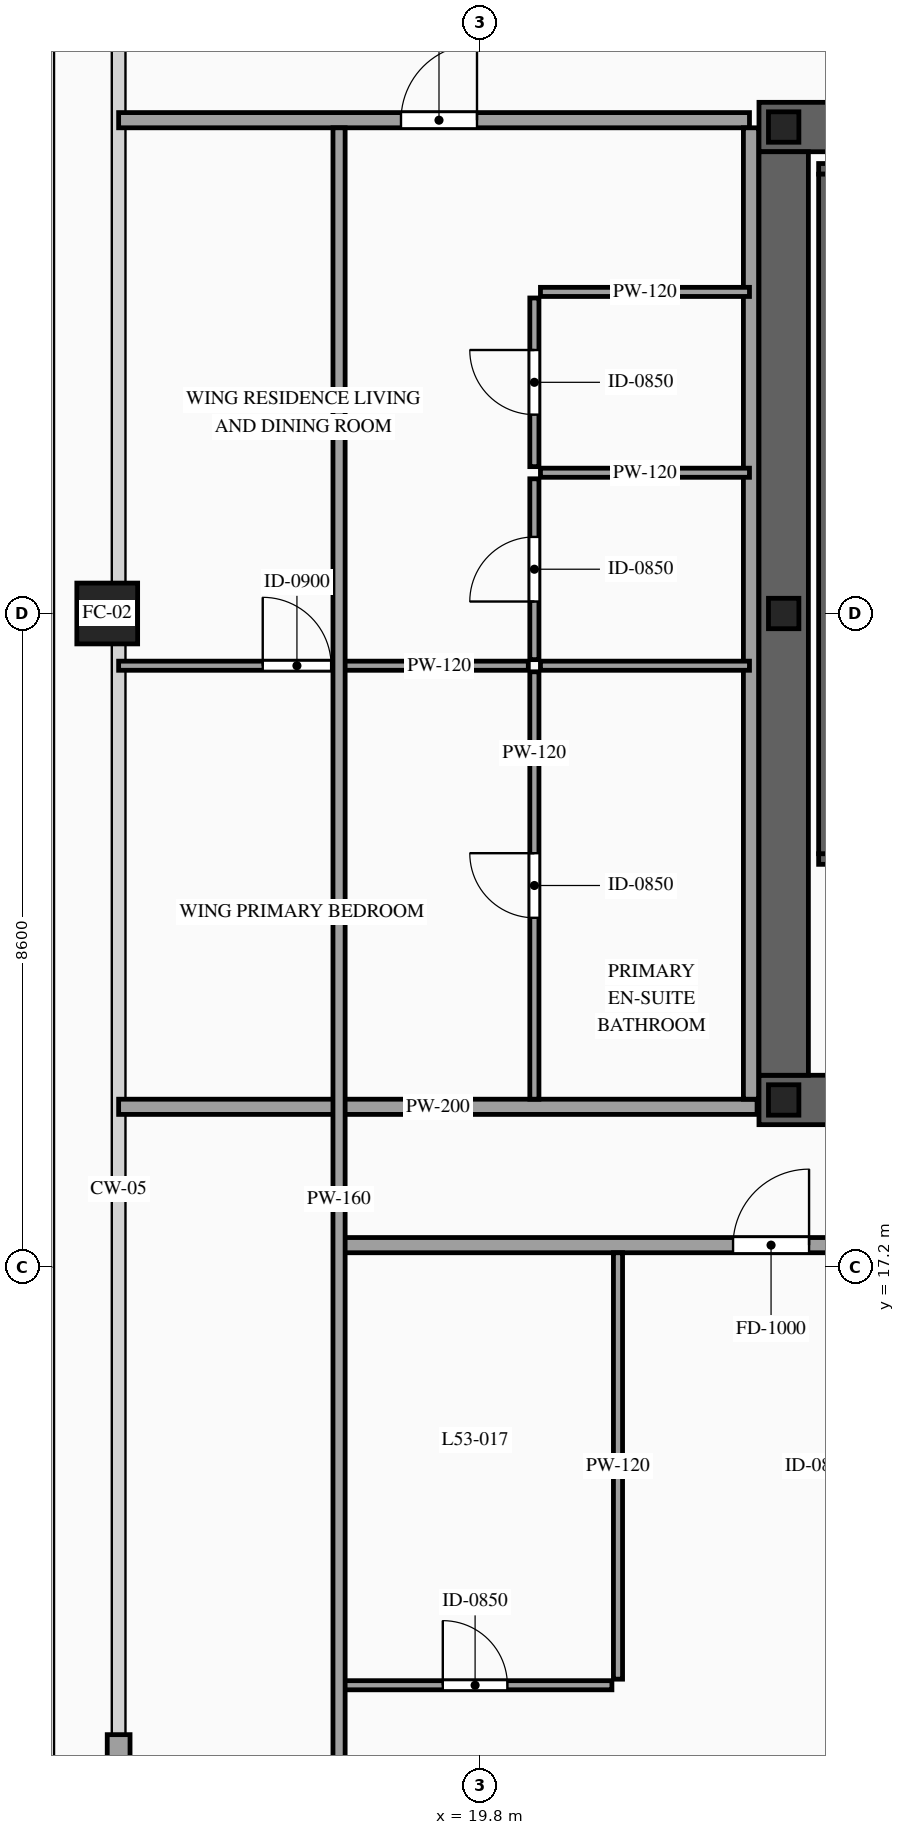
"""IFC4 building model, lengths in metres.
Left out: names, types, materials, properties, quantities, classifications, styles, units other than length and angle.
Written with IfcOpenShell. Run it as: python <this file> out.ifc"""

import sys

from ifc_helpers import new_model, si_unit, direction, frame, frame_2d, origin, origin_2d, place, context, subcontext, project, spatial, rectangle, hollow_rectangle, i_section, extrude, source, transform, mapped, element, fill, save


model = new_model("IFC4")
c1 = context("Model", 3, precision=1e-05, world=origin(), true_north=direction((0.0, 1.0)))
c2 = subcontext(c1, "Body", "Model", "MODEL_VIEW")
j1 = project(units=[si_unit("LENGTHUNIT", "METRE"), si_unit("PLANEANGLEUNIT", "RADIAN")], contexts=[c1])
p1 = place(None, origin())
s1 = spatial("IfcSite", under=j1, at=p1, CompositionType="ELEMENT")
p2 = place(p1, origin())
s2 = spatial("IfcBuilding", under=s1, at=p2, CompositionType="ELEMENT")
p3 = place(p2, frame((0.0, 0.0, 202.0)))
s3 = spatial("IfcBuildingStorey", under=s2, at=p3, CompositionType="ELEMENT", Elevation=202.0)
p4 = place(p3, frame((23.475, 19.4, 0.0), z_axis=(0.0, 0.0, 1.0), x_axis=(1.0, 0.0, 0.0)))
e1 = element("IfcWall", 1, at=p4, inside=s3, PredefinedType="SHEAR", context=c2, shape_type="SweptSolid", body=[
    extrude(rectangle(XDim=27.05, YDim=0.65, at=frame_2d((13.525, 0.0))), origin(), (0.0, 0.0, 1.0), 3.5),
])
p5 = place(p4, frame((1.975, 0.0, 0.0)))
e2 = element("IfcOpeningElement", 2, at=p5, cuts=e1, PredefinedType="OPENING", context=c2, shape_type="SweptSolid", body=[
    extrude(rectangle(XDim=1.1, YDim=2.2, at=frame_2d((0.55, 1.1))), frame((0.0, 0.34, 0.0), z_axis=(0.0, -1.0, 0.0), x_axis=(1.0, 0.0, 0.0)), (0.0, 0.0, 1.0), 0.68),
])
p6 = place(p4, frame((9.875, 0.0, 0.0)))
e3 = element("IfcOpeningElement", 3, at=p6, cuts=e1, PredefinedType="OPENING", context=c2, shape_type="SweptSolid", body=[
    extrude(rectangle(XDim=1.1, YDim=2.2, at=frame_2d((0.55, 1.1))), frame((0.0, 0.34, 0.0), z_axis=(0.0, -1.0, 0.0), x_axis=(1.0, 0.0, 0.0)), (0.0, 0.0, 1.0), 0.68),
])
p7 = place(p4, frame((23.075, 0.0, 0.0)))
e4 = element("IfcOpeningElement", 4, at=p7, cuts=e1, PredefinedType="OPENING", context=c2, shape_type="SweptSolid", body=[
    extrude(rectangle(XDim=1.1, YDim=2.2, at=frame_2d((0.55, 1.1))), frame((0.0, 0.34, 0.0), z_axis=(0.0, -1.0, 0.0), x_axis=(1.0, 0.0, 0.0)), (0.0, 0.0, 1.0), 0.68),
])
p8 = place(p4, frame((19.695, 0.0, 0.0)))
e5 = element("IfcOpeningElement", 5, at=p8, cuts=e1, PredefinedType="OPENING", context=c2, shape_type="SweptSolid", body=[
    extrude(rectangle(XDim=0.9, YDim=2.15, at=frame_2d((0.45, 1.075))), frame((0.0, 0.34, 0.0), z_axis=(0.0, -1.0, 0.0), x_axis=(1.0, 0.0, 0.0)), (0.0, 0.0, 1.0), 0.68),
])
p9 = place(p4, frame((18.255, 0.0, 0.0)))
e6 = element("IfcOpeningElement", 6, at=p9, cuts=e1, PredefinedType="OPENING", context=c2, shape_type="SweptSolid", body=[
    extrude(rectangle(XDim=0.9, YDim=2.15, at=frame_2d((0.45, 1.075))), frame((0.0, 0.34, 0.0), z_axis=(0.0, -1.0, 0.0), x_axis=(1.0, 0.0, 0.0)), (0.0, 0.0, 1.0), 0.68),
])
p10 = place(p3, frame((23.475, 32.2, 0.0), z_axis=(0.0, 0.0, 1.0), x_axis=(1.0, 0.0, 0.0)))
e7 = element("IfcWall", 7, at=p10, inside=s3, PredefinedType="SHEAR", context=c2, shape_type="SweptSolid", body=[
    extrude(rectangle(XDim=27.05, YDim=0.65, at=frame_2d((13.525, 0.0))), origin(), (0.0, 0.0, 1.0), 3.5),
])
p11 = place(p10, frame((4.595, 0.0, 0.0)))
e8 = element("IfcOpeningElement", 8, at=p11, cuts=e7, PredefinedType="OPENING", context=c2, shape_type="SweptSolid", body=[
    extrude(rectangle(XDim=0.9, YDim=2.15, at=frame_2d((0.45, 1.075))), frame((0.0, 0.34, 0.0), z_axis=(0.0, -1.0, 0.0), x_axis=(1.0, 0.0, 0.0)), (0.0, 0.0, 1.0), 0.68),
])
p12 = place(p10, frame((9.875, 0.0, 0.0)))
e9 = element("IfcOpeningElement", 9, at=p12, cuts=e7, PredefinedType="OPENING", context=c2, shape_type="SweptSolid", body=[
    extrude(rectangle(XDim=1.1, YDim=2.2, at=frame_2d((0.55, 1.1))), frame((0.0, 0.34, 0.0), z_axis=(0.0, -1.0, 0.0), x_axis=(1.0, 0.0, 0.0)), (0.0, 0.0, 1.0), 0.68),
])
p13 = place(p10, frame((15.725, 0.0, 0.0)))
e10 = element("IfcOpeningElement", 10, at=p13, cuts=e7, PredefinedType="OPENING", context=c2, shape_type="SweptSolid", body=[
    extrude(rectangle(XDim=1.1, YDim=2.2, at=frame_2d((0.55, 1.1))), frame((0.0, 0.34, 0.0), z_axis=(0.0, -1.0, 0.0), x_axis=(1.0, 0.0, 0.0)), (0.0, 0.0, 1.0), 0.68),
])
m1 = source(origin(), c2, "Body", "SweptSolid", [
    extrude(rectangle(XDim=12.15, YDim=0.65, at=frame_2d((6.075, 0.0))), origin(), (0.0, 0.0, 1.0), 3.5),
])
p14 = place(p3, frame((23.8, 19.725, 0.0), z_axis=(0.0, 0.0, 1.0), x_axis=(0.0, 1.0, 0.0)))
e11 = element("IfcWall", 11, at=p14, inside=s3, PredefinedType="SHEAR", context=c2, shape_type="MappedRepresentation", body=[
    mapped(m1, transform((0.0, 0.0, 0.0), scale=1.0)),
])
m2 = source(origin(), c2, "Body", "SweptSolid", [
    extrude(i_section(OverallWidth=0.4, OverallDepth=0.4, WebThickness=0.013, FlangeThickness=0.021, at=origin_2d()), origin(), (0.0, 0.0, 1.0), 3.5),
])
for number, where, z_axis, x_axis in (
    (12, (23.8, 19.4, 0.0), (0.0, 0.0, 1.0), (1.0, 0.0, 0.0)),
    (13, (23.8, 25.8, 0.0), (0.0, 0.0, 1.0), (1.0, 0.0, 0.0)),
    (14, (23.8, 32.2, 0.0), (0.0, 0.0, 1.0), (1.0, 0.0, 0.0)),
):
    element("IfcColumn", number, at=place(p3, frame(where, z_axis=z_axis, x_axis=x_axis)), inside=s3, PredefinedType="COLUMN", context=c2, shape_type="MappedRepresentation", body=[
        mapped(m2, transform((0.0, 0.0, 0.0), scale=1.0)),
    ])
m3 = source(origin(), c2, "Body", "SweptSolid", [
    extrude(hollow_rectangle(XDim=0.8, YDim=0.8, WallThickness=0.036, at=origin_2d()), origin(), (0.0, 0.0, 1.0), 3.5),
])
p15 = place(p3, frame((14.9, 25.8, 0.0), z_axis=(0.0, 0.0, 1.0), x_axis=(1.0, 0.0, 0.0)))
e15 = element("IfcColumn", 15, at=p15, inside=s3, PredefinedType="COLUMN", context=c2, shape_type="MappedRepresentation", body=[
    mapped(m3, transform((0.0, 0.0, 0.0), scale=1.0)),
])
m4 = source(origin(), c2, "Body", "SweptSolid", [
    extrude(rectangle(XDim=3.05, YDim=0.3, at=frame_2d((1.525, 0.0))), origin(), (0.0, 0.0, 1.0), 2.835),
])
p16 = place(p3, frame((15.05, 8.0, 0.0), z_axis=(0.0, 0.0, 1.0), x_axis=(0.0, 1.0, 0.0)))
e16 = element("IfcWall", 16, at=p16, inside=s3, PredefinedType="SOLIDWALL", context=c2, shape_type="MappedRepresentation", body=[
    mapped(m4, transform((0.0, 0.0, 0.0), scale=1.0)),
])
p17 = place(p3, frame((24.26, 22.57, 0.0), z_axis=(0.0, 0.0, 1.0), x_axis=(1.0, 0.0, 0.0)))
e17 = element("IfcWall", 17, at=p17, inside=s3, PredefinedType="SOLIDWALL", context=c2, shape_type="SweptSolid", body=[
    extrude(rectangle(XDim=3.28, YDim=0.14, at=frame_2d((1.64, 0.0))), origin(), (0.0, 0.0, 1.0), 3.28),
])
p18 = place(p17, frame((1.09, 0.0, 0.0)))
e18 = element("IfcOpeningElement", 18, at=p18, cuts=e17, PredefinedType="OPENING", context=c2, shape_type="SweptSolid", body=[
    extrude(rectangle(XDim=1.1, YDim=2.2, at=frame_2d((0.55, 1.1))), frame((0.0, 0.085, 0.0), z_axis=(0.0, -1.0, 0.0), x_axis=(1.0, 0.0, 0.0)), (0.0, 0.0, 1.0), 0.17),
])
m5 = source(origin(), c2, "Body", "SweptSolid", [
    extrude(rectangle(XDim=3.28, YDim=0.14, at=frame_2d((1.64, 0.0))), origin(), (0.0, 0.0, 1.0), 3.28),
])
p19 = place(p3, frame((24.26, 31.65, 0.0), z_axis=(0.0, 0.0, 1.0), x_axis=(1.0, 0.0, 0.0)))
e19 = element("IfcWall", 19, at=p19, inside=s3, PredefinedType="SOLIDWALL", context=c2, shape_type="MappedRepresentation", body=[
    mapped(m5, transform((0.0, 0.0, 0.0), scale=1.0)),
])
m6 = source(origin(), c2, "Body", "SweptSolid", [
    extrude(rectangle(XDim=8.94, YDim=0.14, at=frame_2d((4.47, 0.0))), origin(), (0.0, 0.0, 1.0), 3.28),
])
p20 = place(p3, frame((24.33, 22.64, 0.0), z_axis=(0.0, 0.0, 1.0), x_axis=(0.0, 1.0, 0.0)))
e20 = element("IfcWall", 20, at=p20, inside=s3, PredefinedType="SOLIDWALL", context=c2, shape_type="MappedRepresentation", body=[
    mapped(m6, transform((0.0, 0.0, 0.0), scale=1.0)),
])
p21 = place(p3, frame((17.94, 17.49, 0.0), z_axis=(0.0, 0.0, 1.0), x_axis=(1.0, 0.0, 0.0)))
e21 = element("IfcWall", 21, at=p21, inside=s3, PredefinedType="PARTITIONING", context=c2, shape_type="SweptSolid", body=[
    extrude(rectangle(XDim=12.5, YDim=0.2, at=frame_2d((6.25, 0.0))), origin(), (0.0, 0.0, 1.0), 3.28),
])
p22 = place(p21, frame((5.194, 0.0, 0.0)))
e22 = element("IfcOpeningElement", 22, at=p22, cuts=e21, PredefinedType="OPENING", context=c2, shape_type="SweptSolid", body=[
    extrude(rectangle(XDim=1.0, YDim=2.2, at=frame_2d((0.5, 1.1))), frame((0.0, 0.115, 0.0), z_axis=(0.0, -1.0, 0.0), x_axis=(1.0, 0.0, 0.0)), (0.0, 0.0, 1.0), 0.23),
])
p23 = place(p3, frame((17.94, 11.7, 0.0), z_axis=(0.0, 0.0, 1.0), x_axis=(1.0, 0.0, 0.0)))
e23 = element("IfcWall", 23, at=p23, inside=s3, PredefinedType="PARTITIONING", context=c2, shape_type="SweptSolid", body=[
    extrude(rectangle(XDim=3.6, YDim=0.12, at=frame_2d((1.8, 0.0))), origin(), (0.0, 0.0, 1.0), 3.28),
])
p24 = place(p23, frame((1.375, 0.0, 0.0)))
e24 = element("IfcOpeningElement", 24, at=p24, cuts=e23, PredefinedType="OPENING", context=c2, shape_type="SweptSolid", body=[
    extrude(rectangle(XDim=0.85, YDim=2.1, at=frame_2d((0.425, 1.05))), frame((0.0, 0.075, 0.0), z_axis=(0.0, -1.0, 0.0), x_axis=(1.0, 0.0, 0.0)), (0.0, 0.0, 1.0), 0.15),
])
m7 = source(origin(), c2, "Body", "SweptSolid", [
    extrude(rectangle(XDim=5.61, YDim=0.12, at=frame_2d((2.805, 0.0))), origin(), (0.0, 0.0, 1.0), 3.28),
])
p25 = place(p3, frame((21.62, 11.78, 0.0), z_axis=(0.0, 0.0, 1.0), x_axis=(0.0, 1.0, 0.0)))
e25 = element("IfcWall", 25, at=p25, inside=s3, PredefinedType="PARTITIONING", context=c2, shape_type="MappedRepresentation", body=[
    mapped(m7, transform((0.0, 0.0, 0.0), scale=1.0)),
])
p26 = place(p3, frame((15.05, 32.29, 0.0), z_axis=(0.0, 0.0, 1.0), x_axis=(1.0, 0.0, 0.0)))
e26 = element("IfcWall", 26, at=p26, inside=s3, PredefinedType="PARTITIONING", context=c2, shape_type="SweptSolid", body=[
    extrude(rectangle(XDim=8.3, YDim=0.2, at=frame_2d((4.15, 0.0))), origin(), (0.0, 0.0, 1.0), 2.775),
])
p27 = place(p26, frame((3.715, 0.0, 0.0)))
e27 = element("IfcOpeningElement", 27, at=p27, cuts=e26, PredefinedType="OPENING", context=c2, shape_type="SweptSolid", body=[
    extrude(rectangle(XDim=1.0, YDim=2.2, at=frame_2d((0.5, 1.1))), frame((0.0, 0.115, 0.0), z_axis=(0.0, -1.0, 0.0), x_axis=(1.0, 0.0, 0.0)), (0.0, 0.0, 1.0), 0.23),
])
m8 = source(origin(), c2, "Body", "SweptSolid", [
    extrude(rectangle(XDim=8.4, YDim=0.2, at=frame_2d((4.2, 0.0))), origin(), (0.0, 0.0, 1.0), 2.775),
])
p28 = place(p3, frame((15.05, 19.31, 0.0), z_axis=(0.0, 0.0, 1.0), x_axis=(1.0, 0.0, 0.0)))
e28 = element("IfcWall", 28, at=p28, inside=s3, PredefinedType="PARTITIONING", context=c2, shape_type="MappedRepresentation", body=[
    mapped(m8, transform((0.0, 0.0, 0.0), scale=1.0)),
])
m9 = source(origin(), c2, "Body", "SweptSolid", [
    extrude(rectangle(XDim=12.78, YDim=0.2, at=frame_2d((6.39, 0.0))), origin(), (0.0, 0.0, 1.0), 3.28),
])
p29 = place(p3, frame((23.37, 19.41, 0.0), z_axis=(0.0, 0.0, 1.0), x_axis=(0.0, 1.0, 0.0)))
e29 = element("IfcWall", 29, at=p29, inside=s3, PredefinedType="PARTITIONING", context=c2, shape_type="MappedRepresentation", body=[
    mapped(m9, transform((0.0, 0.0, 0.0), scale=1.0)),
])
m10 = source(origin(), c2, "Body", "SweptSolid", [
    extrude(rectangle(XDim=2.75, YDim=0.12, at=frame_2d((1.375, 0.0))), origin(), (0.0, 0.0, 1.0), 3.28),
])
for number, where, z_axis, x_axis in (
    (30, (20.6, 25.113, 0.0), (0.0, 0.0, 1.0), (1.0, 0.0, 0.0)),
    (31, (20.6, 27.652, 0.0), (0.0, 0.0, 1.0), (1.0, 0.0, 0.0)),
):
    element("IfcWall", number, at=place(p3, frame(where, z_axis=z_axis, x_axis=x_axis)), inside=s3, PredefinedType="PARTITIONING", context=c2, shape_type="MappedRepresentation", body=[
        mapped(m10, transform((0.0, 0.0, 0.0), scale=1.0)),
    ])
p30 = place(p3, frame((20.52, 25.193, 0.0), z_axis=(0.0, 0.0, 1.0), x_axis=(0.0, 1.0, 0.0)))
e32 = element("IfcWall", 32, at=p30, inside=s3, PredefinedType="PARTITIONING", context=c2, shape_type="SweptSolid", body=[
    extrude(rectangle(XDim=2.379, YDim=0.12, at=frame_2d((1.189, 0.0))), origin(), (0.0, 0.0, 1.0), 3.28),
])
p31 = place(p30, frame((0.764, 0.0, 0.0)))
e33 = element("IfcOpeningElement", 33, at=p31, cuts=e32, PredefinedType="OPENING", context=c2, shape_type="SweptSolid", body=[
    extrude(rectangle(XDim=0.85, YDim=2.1, at=frame_2d((0.425, 1.05))), frame((0.0, 0.075, 0.0), z_axis=(0.0, -1.0, 0.0), x_axis=(1.0, 0.0, 0.0)), (0.0, 0.0, 1.0), 0.15),
])
p32 = place(p3, frame((20.6, 30.031, 0.0), z_axis=(0.0, 0.0, 1.0), x_axis=(1.0, 0.0, 0.0)))
e34 = element("IfcWall", 34, at=p32, inside=s3, PredefinedType="PARTITIONING", context=c2, shape_type="MappedRepresentation", body=[
    mapped(m10, transform((0.0, 0.0, 0.0), scale=1.0)),
])
p33 = place(p3, frame((20.52, 27.732, 0.0), z_axis=(0.0, 0.0, 1.0), x_axis=(0.0, 1.0, 0.0)))
e35 = element("IfcWall", 35, at=p33, inside=s3, PredefinedType="PARTITIONING", context=c2, shape_type="SweptSolid", body=[
    extrude(rectangle(XDim=2.219, YDim=0.12, at=frame_2d((1.109, 0.0))), origin(), (0.0, 0.0, 1.0), 3.28),
])
p34 = place(p33, frame((0.685, 0.0, 0.0)))
e36 = element("IfcOpeningElement", 36, at=p34, cuts=e35, PredefinedType="OPENING", context=c2, shape_type="SweptSolid", body=[
    extrude(rectangle(XDim=0.85, YDim=2.1, at=frame_2d((0.425, 1.05))), frame((0.0, 0.075, 0.0), z_axis=(0.0, -1.0, 0.0), x_axis=(1.0, 0.0, 0.0)), (0.0, 0.0, 1.0), 0.15),
])
p35 = place(p3, frame((15.05, 25.113, 0.0), z_axis=(0.0, 0.0, 1.0), x_axis=(1.0, 0.0, 0.0)))
e37 = element("IfcWall", 37, at=p35, inside=s3, PredefinedType="PARTITIONING", context=c2, shape_type="SweptSolid", body=[
    extrude(rectangle(XDim=5.39, YDim=0.12, at=frame_2d((2.695, 0.0))), origin(), (0.0, 0.0, 1.0), 3.28),
])
p36 = place(p35, frame((1.896, 0.0, 0.0)))
e38 = element("IfcOpeningElement", 38, at=p36, cuts=e37, PredefinedType="OPENING", context=c2, shape_type="SweptSolid", body=[
    extrude(rectangle(XDim=0.9, YDim=2.15, at=frame_2d((0.45, 1.075))), frame((0.0, 0.075, 0.0), z_axis=(0.0, -1.0, 0.0), x_axis=(1.0, 0.0, 0.0)), (0.0, 0.0, 1.0), 0.15),
])
p37 = place(p3, frame((20.52, 19.41, 0.0), z_axis=(0.0, 0.0, 1.0), x_axis=(0.0, 1.0, 0.0)))
e39 = element("IfcWall", 39, at=p37, inside=s3, PredefinedType="PARTITIONING", context=c2, shape_type="SweptSolid", body=[
    extrude(rectangle(XDim=5.623, YDim=0.12, at=frame_2d((2.812, 0.0))), origin(), (0.0, 0.0, 1.0), 3.28),
])
p38 = place(p37, frame((2.386, 0.0, 0.0)))
e40 = element("IfcOpeningElement", 40, at=p38, cuts=e39, PredefinedType="OPENING", context=c2, shape_type="SweptSolid", body=[
    extrude(rectangle(XDim=0.85, YDim=2.1, at=frame_2d((0.425, 1.05))), frame((0.0, 0.075, 0.0), z_axis=(0.0, -1.0, 0.0), x_axis=(1.0, 0.0, 0.0)), (0.0, 0.0, 1.0), 0.15),
])
m11 = source(origin(), c2, "Body", "SweptSolid", [
    extrude(rectangle(XDim=28.19, YDim=0.16, at=frame_2d((14.095, 0.0))), origin(), (0.0, 0.0, 1.0), 3.28),
])
p39 = place(p3, frame((17.95, 4.0, 0.0), z_axis=(0.0, 0.0, 1.0), x_axis=(0.0, 1.0, 0.0)))
e41 = element("IfcWall", 41, at=p39, inside=s3, PredefinedType="PARTITIONING", context=c2, shape_type="MappedRepresentation", body=[
    mapped(m11, transform((0.0, 0.0, 0.0), scale=1.0)),
])
m12 = source(origin(), c2, "Body", "SweptSolid", [
    extrude(rectangle(XDim=1.0, YDim=2.2, at=frame_2d((0.5, 1.1))), frame((0.0, 0.025, 0.0), z_axis=(0.0, -1.0, 0.0), x_axis=(1.0, 0.0, 0.0)), (0.0, 0.0, 1.0), 0.05),
])
p40 = place(p22, origin())
e42 = element("IfcDoor", 42, at=p40, inside=s3, OperationType="SINGLE_SWING_RIGHT", PredefinedType="DOOR", context=c2, shape_type="MappedRepresentation", body=[
    mapped(m12, transform((0.0, 0.0, 0.0), scale=1.0)),
])
fill(e22, e42)
m13 = source(origin(), c2, "Body", "SweptSolid", [
    extrude(rectangle(XDim=0.85, YDim=2.1, at=frame_2d((0.425, 1.05))), frame((0.0, 0.025, 0.0), z_axis=(0.0, -1.0, 0.0), x_axis=(1.0, 0.0, 0.0)), (0.0, 0.0, 1.0), 0.05),
])
p41 = place(p24, origin())
e43 = element("IfcDoor", 43, at=p41, inside=s3, OperationType="SINGLE_SWING_LEFT", PredefinedType="DOOR", context=c2, shape_type="MappedRepresentation", body=[
    mapped(m13, transform((0.0, 0.0, 0.0), scale=1.0)),
])
fill(e24, e43)
p42 = place(p27, origin())
e44 = element("IfcDoor", 44, at=p42, inside=s3, OperationType="SINGLE_SWING_RIGHT", PredefinedType="DOOR", context=c2, shape_type="MappedRepresentation", body=[
    mapped(m12, transform((0.0, 0.0, 0.0), scale=1.0)),
])
fill(e27, e44)
p43 = place(p31, origin())
e45 = element("IfcDoor", 45, at=p43, inside=s3, OperationType="SINGLE_SWING_LEFT", PredefinedType="DOOR", context=c2, shape_type="MappedRepresentation", body=[
    mapped(m13, transform((0.0, 0.0, 0.0), scale=1.0)),
])
fill(e33, e45)
p44 = place(p34, origin())
e46 = element("IfcDoor", 46, at=p44, inside=s3, OperationType="SINGLE_SWING_RIGHT", PredefinedType="DOOR", context=c2, shape_type="MappedRepresentation", body=[
    mapped(m13, transform((0.0, 0.0, 0.0), scale=1.0)),
])
fill(e36, e46)
m14 = source(origin(), c2, "Body", "SweptSolid", [
    extrude(rectangle(XDim=0.9, YDim=2.15, at=frame_2d((0.45, 1.075))), frame((0.0, 0.025, 0.0), z_axis=(0.0, -1.0, 0.0), x_axis=(1.0, 0.0, 0.0)), (0.0, 0.0, 1.0), 0.05),
])
p45 = place(p36, origin())
e47 = element("IfcDoor", 47, at=p45, inside=s3, OperationType="SINGLE_SWING_LEFT", PredefinedType="DOOR", context=c2, shape_type="MappedRepresentation", body=[
    mapped(m14, transform((0.0, 0.0, 0.0), scale=1.0)),
])
fill(e38, e47)
p46 = place(p38, origin())
e48 = element("IfcDoor", 48, at=p46, inside=s3, OperationType="SINGLE_SWING_RIGHT", PredefinedType="DOOR", context=c2, shape_type="MappedRepresentation", body=[
    mapped(m13, transform((0.0, 0.0, 0.0), scale=1.0)),
])
fill(e40, e48)
save(model, sys.argv[1])
